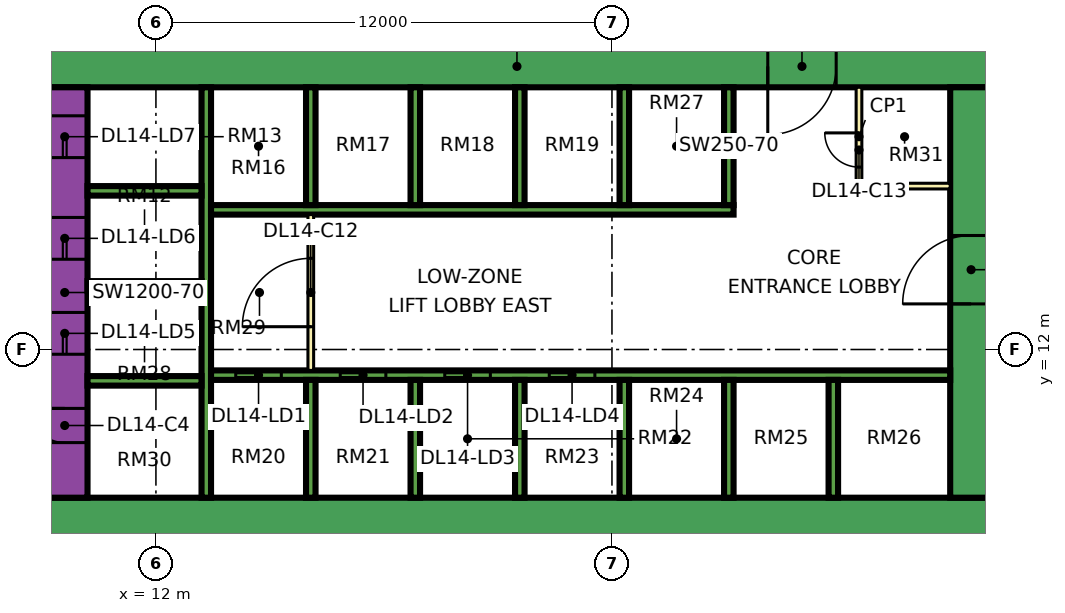
"""IFC4 building model, lengths in metres.
Left out: names, types, materials, properties, quantities, classifications, styles, units other than length and angle.
Written with IfcOpenShell. Run it as: python <this file> out.ifc"""

import sys

from ifc_helpers import new_model, si_unit, direction, frame, frame_2d, origin, place, context, subcontext, project, spatial, rectangle, extrude, element, fill, save


model = new_model("IFC4")
c1 = context("Model", 3, precision=1e-05, world=origin(), true_north=direction((0.0, 1.0)))
c2 = subcontext(c1, "Body", "Model", "MODEL_VIEW")
j1 = project(units=[si_unit("LENGTHUNIT", "METRE"), si_unit("PLANEANGLEUNIT", "RADIAN")], contexts=[c1])
p1 = place(None, origin())
s1 = spatial("IfcSite", under=j1, at=p1, CompositionType="ELEMENT")
p2 = place(p1, origin())
s2 = spatial("IfcBuilding", under=s1, at=p2, CompositionType="ELEMENT")
p3 = place(p2, frame((0.0, 0.0, 67.65)))
s3 = spatial("IfcBuildingStorey", under=s2, at=p3, CompositionType="ELEMENT", Elevation=67.65)
p4 = place(p3, frame((9.0, 7.55, 0.0), z_axis=(0.0, 0.0, 1.0), x_axis=(1.0, 0.0, 0.0)))
e1 = element("IfcWall", 1, at=p4, inside=s3, PredefinedType="SHEAR", context=c2, shape_type="SweptSolid", body=[
    extrude(rectangle(XDim=25.0, YDim=1.1, at=frame_2d((12.5, 0.0))), origin(), (0.0, 0.0, 1.0), 3.75),
])
p5 = place(p3, frame((9.0, 19.45, 0.0), z_axis=(0.0, 0.0, 1.0), x_axis=(1.0, 0.0, 0.0)))
e2 = element("IfcWall", 2, at=p5, inside=s3, PredefinedType="SHEAR", context=c2, shape_type="SweptSolid", body=[
    extrude(rectangle(XDim=25.0, YDim=1.1, at=frame_2d((12.5, 0.0))), origin(), (0.0, 0.0, 1.0), 3.75),
])
p6 = place(p5, frame((19.1, 0.0, 0.0)))
e3 = element("IfcOpeningElement", 3, at=p6, cuts=e2, PredefinedType="OPENING", context=c2, shape_type="SweptSolid", body=[
    extrude(rectangle(XDim=1.8, YDim=2.4, at=frame_2d((0.9, 1.2))), frame((0.0, 0.56, 0.0), z_axis=(0.0, -1.0, 0.0), x_axis=(1.0, 0.0, 0.0)), (0.0, 0.0, 1.0), 1.12),
])
p7 = place(p3, frame((9.6, 8.1, 0.0), z_axis=(0.0, 0.0, 1.0), x_axis=(0.0, 1.0, 0.0)))
e4 = element("IfcWall", 4, at=p7, inside=s3, PredefinedType="SHEAR", context=c2, shape_type="SweptSolid", body=[
    extrude(rectangle(XDim=10.8, YDim=1.2, at=frame_2d((5.4, 0.0))), origin(), (0.0, 0.0, 1.0), 3.75),
])
p8 = place(p7, frame((3.775, 0.0, 0.0)))
e5 = element("IfcOpeningElement", 5, at=p8, cuts=e4, PredefinedType="OPENING", context=c2, shape_type="SweptSolid", body=[
    extrude(rectangle(XDim=1.1, YDim=2.2, at=frame_2d((0.55, 1.1))), frame((0.0, 0.61, 0.0), z_axis=(0.0, -1.0, 0.0), x_axis=(1.0, 0.0, 0.0)), (0.0, 0.0, 1.0), 1.22),
])
p9 = place(p7, frame((6.275, 0.0, 0.0)))
e6 = element("IfcOpeningElement", 6, at=p9, cuts=e4, PredefinedType="OPENING", context=c2, shape_type="SweptSolid", body=[
    extrude(rectangle(XDim=1.1, YDim=2.2, at=frame_2d((0.55, 1.1))), frame((0.0, 0.61, 0.0), z_axis=(0.0, -1.0, 0.0), x_axis=(1.0, 0.0, 0.0)), (0.0, 0.0, 1.0), 1.22),
])
p10 = place(p7, frame((8.95, 0.0, 0.0)))
e7 = element("IfcOpeningElement", 7, at=p10, cuts=e4, PredefinedType="OPENING", context=c2, shape_type="SweptSolid", body=[
    extrude(rectangle(XDim=1.1, YDim=2.2, at=frame_2d((0.55, 1.1))), frame((0.0, 0.61, 0.0), z_axis=(0.0, -1.0, 0.0), x_axis=(1.0, 0.0, 0.0)), (0.0, 0.0, 1.0), 1.22),
])
p11 = place(p7, frame((1.45, 0.0, 0.0)))
e8 = element("IfcOpeningElement", 8, at=p11, cuts=e4, PredefinedType="OPENING", context=c2, shape_type="SweptSolid", body=[
    extrude(rectangle(XDim=0.9, YDim=2.1, at=frame_2d((0.45, 1.05))), frame((0.0, 0.61, 0.0), z_axis=(0.0, -1.0, 0.0), x_axis=(1.0, 0.0, 0.0)), (0.0, 0.0, 1.0), 1.22),
])
p12 = place(p3, frame((33.45, 8.1, 0.0), z_axis=(0.0, 0.0, 1.0), x_axis=(0.0, 1.0, 0.0)))
e9 = element("IfcWall", 9, at=p12, inside=s3, PredefinedType="SHEAR", context=c2, shape_type="SweptSolid", body=[
    extrude(rectangle(XDim=10.8, YDim=1.1, at=frame_2d((5.4, 0.0))), origin(), (0.0, 0.0, 1.0), 3.75),
])
p13 = place(p12, frame((5.1, 0.0, 0.0)))
e10 = element("IfcOpeningElement", 10, at=p13, cuts=e9, PredefinedType="OPENING", context=c2, shape_type="SweptSolid", body=[
    extrude(rectangle(XDim=1.8, YDim=2.4, at=frame_2d((0.9, 1.2))), frame((0.0, 0.56, 0.0), z_axis=(0.0, -1.0, 0.0), x_axis=(1.0, 0.0, 0.0)), (0.0, 0.0, 1.0), 1.12),
])
p14 = place(p3, frame((13.325, 8.1, 0.0), z_axis=(0.0, 0.0, 1.0), x_axis=(0.0, 1.0, 0.0)))
e11 = element("IfcWall", 11, at=p14, inside=s3, PredefinedType="SHEAR", context=c2, shape_type="SweptSolid", body=[
    extrude(rectangle(XDim=10.8, YDim=0.25, at=frame_2d((5.4, 0.0))), origin(), (0.0, 0.0, 1.0), 3.75),
])
p15 = place(p3, frame((13.45, 11.325, 0.0), z_axis=(0.0, 0.0, 1.0), x_axis=(1.0, 0.0, 0.0)))
e12 = element("IfcWall", 12, at=p15, inside=s3, PredefinedType="SHEAR", context=c2, shape_type="SweptSolid", body=[
    extrude(rectangle(XDim=19.45, YDim=0.25, at=frame_2d((9.725, 0.0))), origin(), (0.0, 0.0, 1.0), 3.75),
])
p16 = place(p15, frame((0.65, 0.0, 0.0)))
e13 = element("IfcOpeningElement", 13, at=p16, cuts=e12, PredefinedType="OPENING", context=c2, shape_type="SweptSolid", body=[
    extrude(rectangle(XDim=1.2, YDim=2.2, at=frame_2d((0.6, 1.1))), frame((0.0, 0.135, 0.0), z_axis=(0.0, -1.0, 0.0), x_axis=(1.0, 0.0, 0.0)), (0.0, 0.0, 1.0), 0.27),
])
p17 = place(p15, frame((3.4, 0.0, 0.0)))
e14 = element("IfcOpeningElement", 14, at=p17, cuts=e12, PredefinedType="OPENING", context=c2, shape_type="SweptSolid", body=[
    extrude(rectangle(XDim=1.2, YDim=2.2, at=frame_2d((0.6, 1.1))), frame((0.0, 0.135, 0.0), z_axis=(0.0, -1.0, 0.0), x_axis=(1.0, 0.0, 0.0)), (0.0, 0.0, 1.0), 0.27),
])
p18 = place(p15, frame((6.15, 0.0, 0.0)))
e15 = element("IfcOpeningElement", 15, at=p18, cuts=e12, PredefinedType="OPENING", context=c2, shape_type="SweptSolid", body=[
    extrude(rectangle(XDim=1.2, YDim=2.2, at=frame_2d((0.6, 1.1))), frame((0.0, 0.135, 0.0), z_axis=(0.0, -1.0, 0.0), x_axis=(1.0, 0.0, 0.0)), (0.0, 0.0, 1.0), 0.27),
])
p19 = place(p15, frame((8.9, 0.0, 0.0)))
e16 = element("IfcOpeningElement", 16, at=p19, cuts=e12, PredefinedType="OPENING", context=c2, shape_type="SweptSolid", body=[
    extrude(rectangle(XDim=1.2, YDim=2.2, at=frame_2d((0.6, 1.1))), frame((0.0, 0.135, 0.0), z_axis=(0.0, -1.0, 0.0), x_axis=(1.0, 0.0, 0.0)), (0.0, 0.0, 1.0), 0.27),
])
p20 = place(p3, frame((13.45, 15.675, 0.0), z_axis=(0.0, 0.0, 1.0), x_axis=(1.0, 0.0, 0.0)))
e17 = element("IfcWall", 17, at=p20, inside=s3, PredefinedType="SHEAR", context=c2, shape_type="SweptSolid", body=[
    extrude(rectangle(XDim=13.75, YDim=0.25, at=frame_2d((6.875, 0.0))), origin(), (0.0, 0.0, 1.0), 3.75),
])
for number, where, z_axis, x_axis in (
    (18, (10.2, 11.175, 0.0), (0.0, 0.0, 1.0), (1.0, 0.0, 0.0)),
    (19, (10.2, 13.675, 0.0), (0.0, 0.0, 1.0), (1.0, 0.0, 0.0)),
    (20, (10.2, 16.175, 0.0), (0.0, 0.0, 1.0), (1.0, 0.0, 0.0)),
):
    element("IfcWall", number, at=place(p3, frame(where, z_axis=z_axis, x_axis=x_axis)), inside=s3, PredefinedType="SHEAR", context=c2, shape_type="SweptSolid", body=[
        extrude(rectangle(XDim=3.0, YDim=0.25, at=frame_2d((1.5, 0.0))), origin(), (0.0, 0.0, 1.0), 3.75),
    ])
for number, where, z_axis, x_axis in (
    (21, (16.075, 8.1, 0.0), (0.0, 0.0, 1.0), (0.0, 1.0, 0.0)),
    (22, (18.825, 8.1, 0.0), (0.0, 0.0, 1.0), (0.0, 1.0, 0.0)),
    (23, (21.575, 8.1, 0.0), (0.0, 0.0, 1.0), (0.0, 1.0, 0.0)),
    (24, (24.325, 8.1, 0.0), (0.0, 0.0, 1.0), (0.0, 1.0, 0.0)),
    (25, (27.075, 8.1, 0.0), (0.0, 0.0, 1.0), (0.0, 1.0, 0.0)),
    (26, (29.825, 8.1, 0.0), (0.0, 0.0, 1.0), (0.0, 1.0, 0.0)),
    (27, (16.075, 15.8, 0.0), (0.0, 0.0, 1.0), (0.0, 1.0, 0.0)),
    (28, (18.825, 15.8, 0.0), (0.0, 0.0, 1.0), (0.0, 1.0, 0.0)),
    (29, (21.575, 15.8, 0.0), (0.0, 0.0, 1.0), (0.0, 1.0, 0.0)),
    (30, (24.325, 15.8, 0.0), (0.0, 0.0, 1.0), (0.0, 1.0, 0.0)),
    (31, (27.075, 15.8, 0.0), (0.0, 0.0, 1.0), (0.0, 1.0, 0.0)),
):
    element("IfcWall", number, at=place(p3, frame(where, z_axis=z_axis, x_axis=x_axis)), inside=s3, PredefinedType="SHEAR", context=c2, shape_type="SweptSolid", body=[
        extrude(rectangle(XDim=3.1, YDim=0.25, at=frame_2d((1.55, 0.0))), origin(), (0.0, 0.0, 1.0), 3.75),
    ])
p21 = place(p3, frame((-1.447, 12.553, 0.0), z_axis=(0.0, 0.0, 1.0), x_axis=(0.707106781187, -0.707106781187, 0.0)))
e32 = element("IfcWall", 32, at=p21, inside=s3, PredefinedType="SOLIDWALL", context=c2, shape_type="SweptSolid", body=[
    extrude(rectangle(XDim=19.799, YDim=0.15, at=frame_2d((9.899, 0.0))), origin(), (0.0, 0.0, 1.0), 3.35),
])
p22 = place(p21, frame((2.212, 0.0, 0.45)))
e33 = element("IfcOpeningElement", 33, at=p22, cuts=e32, PredefinedType="OPENING", context=c2, shape_type="SweptSolid", body=[
    extrude(rectangle(XDim=3.0, YDim=2.4, at=frame_2d((1.5, 1.2))), frame((0.0, 0.085, 0.0), z_axis=(0.0, -1.0, 0.0), x_axis=(1.0, 0.0, 0.0)), (0.0, 0.0, 1.0), 0.17),
])
p23 = place(p21, frame((10.216, 0.0, 0.45)))
e34 = element("IfcOpeningElement", 34, at=p23, cuts=e32, PredefinedType="OPENING", context=c2, shape_type="SweptSolid", body=[
    extrude(rectangle(XDim=3.0, YDim=2.4, at=frame_2d((1.5, 1.2))), frame((0.0, 0.085, 0.0), z_axis=(0.0, -1.0, 0.0), x_axis=(1.0, 0.0, 0.0)), (0.0, 0.0, 1.0), 0.17),
])
p24 = place(p3, frame((16.075, 11.45, 0.0), z_axis=(0.0, 0.0, 1.0), x_axis=(0.0, 1.0, 0.0)))
e35 = element("IfcWall", 35, at=p24, inside=s3, PredefinedType="PARTITIONING", context=c2, shape_type="SweptSolid", body=[
    extrude(rectangle(XDim=4.1, YDim=0.15, at=frame_2d((2.05, 0.0))), origin(), (0.0, 0.0, 1.0), 3.35),
])
p25 = place(p24, frame((1.15, 0.0, 0.0)))
e36 = element("IfcOpeningElement", 36, at=p25, cuts=e35, PredefinedType="OPENING", context=c2, shape_type="SweptSolid", body=[
    extrude(rectangle(XDim=1.8, YDim=2.4, at=frame_2d((0.9, 1.2))), frame((0.0, 0.085, 0.0), z_axis=(0.0, -1.0, 0.0), x_axis=(1.0, 0.0, 0.0)), (0.0, 0.0, 1.0), 0.17),
])
p26 = place(p3, frame((30.5, 16.3, 0.0), z_axis=(0.0, 0.0, 1.0), x_axis=(0.0, 1.0, 0.0)))
e37 = element("IfcWall", 37, at=p26, inside=s3, PredefinedType="PARTITIONING", context=c2, shape_type="SweptSolid", body=[
    extrude(rectangle(XDim=2.6, YDim=0.15, at=frame_2d((1.3, 0.0))), origin(), (0.0, 0.0, 1.0), 3.35),
])
p27 = place(p26, frame((0.5, 0.0, 0.0)))
e38 = element("IfcOpeningElement", 38, at=p27, cuts=e37, PredefinedType="OPENING", context=c2, shape_type="SweptSolid", body=[
    extrude(rectangle(XDim=0.9, YDim=2.1, at=frame_2d((0.45, 1.05))), frame((0.0, 0.085, 0.0), z_axis=(0.0, -1.0, 0.0), x_axis=(1.0, 0.0, 0.0)), (0.0, 0.0, 1.0), 0.17),
])
p28 = place(p3, frame((30.5, 16.3, 0.0), z_axis=(0.0, 0.0, 1.0), x_axis=(1.0, 0.0, 0.0)))
e39 = element("IfcWall", 39, at=p28, inside=s3, PredefinedType="PARTITIONING", context=c2, shape_type="SweptSolid", body=[
    extrude(rectangle(XDim=2.4, YDim=0.15, at=frame_2d((1.2, 0.0))), origin(), (0.0, 0.0, 1.0), 3.35),
])
p29 = place(p16, origin())
e40 = element("IfcDoor", 40, at=p29, inside=s3, OperationType="DOUBLE_DOOR_SLIDING", PredefinedType="DOOR", context=c2, shape_type="SweptSolid", body=[
    extrude(rectangle(XDim=1.2, YDim=2.2, at=frame_2d((0.6, 1.1))), frame((0.0, 0.025, 0.0), z_axis=(0.0, -1.0, 0.0), x_axis=(1.0, 0.0, 0.0)), (0.0, 0.0, 1.0), 0.05),
])
fill(e13, e40)
p30 = place(p17, origin())
e41 = element("IfcDoor", 41, at=p30, inside=s3, OperationType="DOUBLE_DOOR_SLIDING", PredefinedType="DOOR", context=c2, shape_type="SweptSolid", body=[
    extrude(rectangle(XDim=1.2, YDim=2.2, at=frame_2d((0.6, 1.1))), frame((0.0, 0.025, 0.0), z_axis=(0.0, -1.0, 0.0), x_axis=(1.0, 0.0, 0.0)), (0.0, 0.0, 1.0), 0.05),
])
fill(e14, e41)
p31 = place(p18, origin())
e42 = element("IfcDoor", 42, at=p31, inside=s3, OperationType="DOUBLE_DOOR_SLIDING", PredefinedType="DOOR", context=c2, shape_type="SweptSolid", body=[
    extrude(rectangle(XDim=1.2, YDim=2.2, at=frame_2d((0.6, 1.1))), frame((0.0, 0.025, 0.0), z_axis=(0.0, -1.0, 0.0), x_axis=(1.0, 0.0, 0.0)), (0.0, 0.0, 1.0), 0.05),
])
fill(e15, e42)
p32 = place(p19, origin())
e43 = element("IfcDoor", 43, at=p32, inside=s3, OperationType="DOUBLE_DOOR_SLIDING", PredefinedType="DOOR", context=c2, shape_type="SweptSolid", body=[
    extrude(rectangle(XDim=1.2, YDim=2.2, at=frame_2d((0.6, 1.1))), frame((0.0, 0.025, 0.0), z_axis=(0.0, -1.0, 0.0), x_axis=(1.0, 0.0, 0.0)), (0.0, 0.0, 1.0), 0.05),
])
fill(e16, e43)
p33 = place(p8, origin())
e44 = element("IfcDoor", 44, at=p33, inside=s3, OperationType="DOUBLE_DOOR_SLIDING", PredefinedType="DOOR", context=c2, shape_type="SweptSolid", body=[
    extrude(rectangle(XDim=1.1, YDim=2.2, at=frame_2d((0.55, 1.1))), frame((0.0, 0.025, 0.0), z_axis=(0.0, -1.0, 0.0), x_axis=(1.0, 0.0, 0.0)), (0.0, 0.0, 1.0), 0.05),
])
fill(e5, e44)
p34 = place(p9, origin())
e45 = element("IfcDoor", 45, at=p34, inside=s3, OperationType="DOUBLE_DOOR_SLIDING", PredefinedType="DOOR", context=c2, shape_type="SweptSolid", body=[
    extrude(rectangle(XDim=1.1, YDim=2.2, at=frame_2d((0.55, 1.1))), frame((0.0, 0.025, 0.0), z_axis=(0.0, -1.0, 0.0), x_axis=(1.0, 0.0, 0.0)), (0.0, 0.0, 1.0), 0.05),
])
fill(e6, e45)
p35 = place(p10, origin())
e46 = element("IfcDoor", 46, at=p35, inside=s3, OperationType="DOUBLE_DOOR_SLIDING", PredefinedType="DOOR", context=c2, shape_type="SweptSolid", body=[
    extrude(rectangle(XDim=1.1, YDim=2.2, at=frame_2d((0.55, 1.1))), frame((0.0, 0.025, 0.0), z_axis=(0.0, -1.0, 0.0), x_axis=(1.0, 0.0, 0.0)), (0.0, 0.0, 1.0), 0.05),
])
fill(e7, e46)
p36 = place(p13, origin())
e47 = element("IfcDoor", 47, at=p36, inside=s3, OperationType="DOUBLE_DOOR_SINGLE_SWING", PredefinedType="DOOR", context=c2, shape_type="SweptSolid", body=[
    extrude(rectangle(XDim=1.8, YDim=2.4, at=frame_2d((0.9, 1.2))), frame((0.0, 0.025, 0.0), z_axis=(0.0, -1.0, 0.0), x_axis=(1.0, 0.0, 0.0)), (0.0, 0.0, 1.0), 0.05),
])
fill(e10, e47)
p37 = place(p6, frame((1.8, 0.0, 0.0), z_axis=(0.0, 0.0, 1.0), x_axis=(-1.0, 0.0, 0.0)))
e48 = element("IfcDoor", 48, at=p37, inside=s3, OperationType="DOUBLE_DOOR_SINGLE_SWING", PredefinedType="DOOR", context=c2, shape_type="SweptSolid", body=[
    extrude(rectangle(XDim=1.8, YDim=2.4, at=frame_2d((0.9, 1.2))), frame((0.0, 0.025, 0.0), z_axis=(0.0, -1.0, 0.0), x_axis=(1.0, 0.0, 0.0)), (0.0, 0.0, 1.0), 0.05),
])
fill(e3, e48)
p38 = place(p11, frame((0.9, 0.0, 0.0), z_axis=(0.0, 0.0, 1.0), x_axis=(-1.0, 0.0, 0.0)))
e49 = element("IfcDoor", 49, at=p38, inside=s3, OperationType="SINGLE_SWING_RIGHT", PredefinedType="DOOR", context=c2, shape_type="SweptSolid", body=[
    extrude(rectangle(XDim=0.9, YDim=2.1, at=frame_2d((0.45, 1.05))), frame((0.0, 0.025, 0.0), z_axis=(0.0, -1.0, 0.0), x_axis=(1.0, 0.0, 0.0)), (0.0, 0.0, 1.0), 0.05),
])
fill(e8, e49)
p39 = place(p25, origin())
e50 = element("IfcDoor", 50, at=p39, inside=s3, OperationType="DOUBLE_DOOR_SINGLE_SWING", PredefinedType="DOOR", context=c2, shape_type="SweptSolid", body=[
    extrude(rectangle(XDim=1.8, YDim=2.4, at=frame_2d((0.9, 1.2))), frame((0.0, 0.025, 0.0), z_axis=(0.0, -1.0, 0.0), x_axis=(1.0, 0.0, 0.0)), (0.0, 0.0, 1.0), 0.05),
])
fill(e36, e50)
p40 = place(p27, frame((0.9, 0.0, 0.0), z_axis=(0.0, 0.0, 1.0), x_axis=(-1.0, 0.0, 0.0)))
e51 = element("IfcDoor", 51, at=p40, inside=s3, OperationType="SINGLE_SWING_RIGHT", PredefinedType="DOOR", context=c2, shape_type="SweptSolid", body=[
    extrude(rectangle(XDim=0.9, YDim=2.1, at=frame_2d((0.45, 1.05))), frame((0.0, 0.025, 0.0), z_axis=(0.0, -1.0, 0.0), x_axis=(1.0, 0.0, 0.0)), (0.0, 0.0, 1.0), 0.05),
])
fill(e38, e51)
save(model, sys.argv[1])
